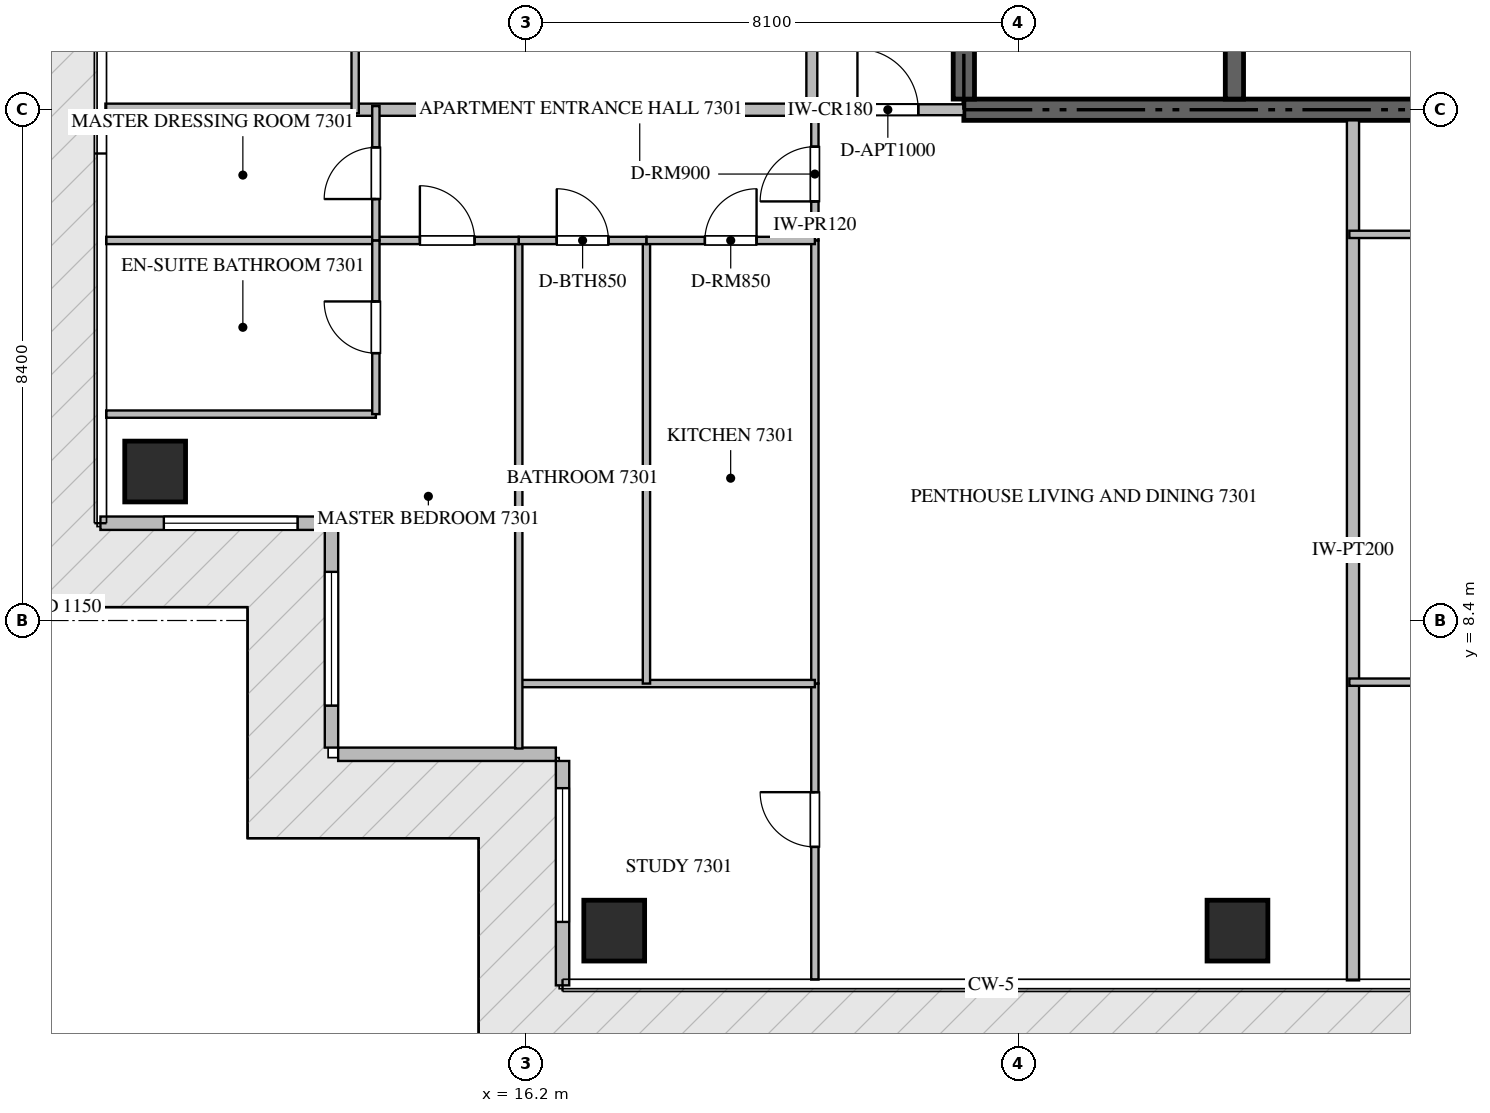
"""IFC4 building model, lengths in metres.
Left out: names, types, materials, properties, quantities, classifications, styles, units other than length and angle.
Written with IfcOpenShell. Run it as: python <this file> out.ifc"""

import sys

from ifc_helpers import new_model, si_unit, direction, frame, frame_2d, origin, origin_2d, place, context, subcontext, project, spatial, rectangle, extrude, source, transform, mapped, element, fill, save


model = new_model("IFC4")
c1 = context("Model", 3, precision=1e-05, world=origin(), true_north=direction((0.0, 1.0)))
c2 = subcontext(c1, "Body", "Model", "MODEL_VIEW")
j1 = project(units=[si_unit("LENGTHUNIT", "METRE"), si_unit("PLANEANGLEUNIT", "RADIAN")], contexts=[c1])
p1 = place(None, origin())
s1 = spatial("IfcSite", under=j1, at=p1, CompositionType="ELEMENT")
p2 = place(p1, origin())
s2 = spatial("IfcBuilding", under=s1, at=p2, CompositionType="ELEMENT")
p3 = place(p2, frame((0.0, 0.0, 293.45)))
s3 = spatial("IfcBuildingStorey", under=s2, at=p3, CompositionType="ELEMENT", Elevation=293.45)
p4 = place(p3, frame((23.4, 16.8, -0.26), z_axis=(0.0, 0.0, 1.0), x_axis=(1.0, 0.0, 0.0)))
e1 = element("IfcWall", 1, at=p4, inside=s3, PredefinedType="SHEAR", context=c2, shape_type="SweptSolid", body=[
    extrude(rectangle(XDim=18.0, YDim=0.35, at=frame_2d((9.0, 0.0))), origin(), (0.0, 0.0, 1.0), 4.048),
])
p5 = place(p3, frame((23.4, 16.975, -0.26), z_axis=(0.0, 0.0, 1.0), x_axis=(0.0, 1.0, 0.0)))
e2 = element("IfcWall", 2, at=p5, inside=s3, PredefinedType="SHEAR", context=c2, shape_type="SweptSolid", body=[
    extrude(rectangle(XDim=4.875, YDim=0.35, at=frame_2d((2.438, 0.0))), origin(), (0.0, 0.0, 1.0), 4.048),
])
p6 = place(p3, frame((27.85, 16.975, -0.26), z_axis=(0.0, 0.0, 1.0), x_axis=(0.0, 1.0, 0.0)))
e3 = element("IfcWall", 3, at=p6, inside=s3, PredefinedType="SHEAR", context=c2, shape_type="SweptSolid", body=[
    extrude(rectangle(XDim=4.875, YDim=0.3, at=frame_2d((2.438, 0.0))), origin(), (0.0, 0.0, 1.0), 4.048),
])
m1 = source(origin(), c2, "Body", "SweptSolid", [
    extrude(rectangle(XDim=1.0, YDim=1.0, at=origin_2d()), origin(), (0.0, 0.0, 1.0), 4.05),
])
for number, where, z_axis, x_axis in (
    (4, (17.65, 3.3, -0.26), (0.0, 0.0, 1.0), (1.0, 0.0, 0.0)),
    (5, (27.9, 3.3, -0.26), (0.0, 0.0, 1.0), (1.0, 0.0, 0.0)),
    (6, (10.1, 10.85, -0.26), (0.0, 0.0, 1.0), (1.0, 0.0, 0.0)),
):
    element("IfcColumn", number, at=place(p3, frame(where, z_axis=z_axis, x_axis=x_axis)), inside=s3, PredefinedType="COLUMN", context=c2, shape_type="MappedRepresentation", body=[
        mapped(m1, transform((0.0, 0.0, 0.0), scale=1.0)),
    ])
p7 = place(p3, frame((9.2, 10.0, 0.0), z_axis=(0.0, 0.0, 1.0), x_axis=(1.0, 0.0, 0.0)))
e7 = element("IfcWall", 7, at=p7, inside=s3, PredefinedType="ELEMENTEDWALL", context=c2, shape_type="SweptSolid", body=[
    extrude(rectangle(XDim=3.69, YDim=0.22, at=frame_2d((1.845, 0.0))), origin(), (0.0, 0.0, 1.0), 3.775),
])
p8 = place(p7, frame((1.043, 0.0, 0.65)))
e8 = element("IfcOpeningElement", 8, at=p8, cuts=e7, PredefinedType="OPENING", context=c2, shape_type="SweptSolid", body=[
    extrude(rectangle(XDim=2.2, YDim=2.4, at=frame_2d((1.1, 1.2))), frame((0.0, 0.12, 0.0), z_axis=(0.0, -1.0, 0.0), x_axis=(1.0, 0.0, 0.0)), (0.0, 0.0, 1.0), 0.24),
])
p9 = place(p3, frame((13.0, 9.89, 0.0), z_axis=(0.0, 0.0, 1.0), x_axis=(0.0, -1.0, 0.0)))
e9 = element("IfcWall", 9, at=p9, inside=s3, PredefinedType="ELEMENTEDWALL", context=c2, shape_type="SweptSolid", body=[
    extrude(rectangle(XDim=3.58, YDim=0.22, at=frame_2d((1.79, 0.0))), origin(), (0.0, 0.0, 1.0), 3.775),
])
p10 = place(p9, frame((0.69, 0.0, 0.65)))
e10 = element("IfcOpeningElement", 10, at=p10, cuts=e9, PredefinedType="OPENING", context=c2, shape_type="SweptSolid", body=[
    extrude(rectangle(XDim=2.2, YDim=2.4, at=frame_2d((1.1, 1.2))), frame((0.0, 0.12, 0.0), z_axis=(0.0, -1.0, 0.0), x_axis=(1.0, 0.0, 0.0)), (0.0, 0.0, 1.0), 0.24),
])
p11 = place(p3, frame((13.11, 6.2, 0.0), z_axis=(0.0, 0.0, 1.0), x_axis=(1.0, 0.0, 0.0)))
e11 = element("IfcWall", 11, at=p11, inside=s3, PredefinedType="ELEMENTEDWALL", context=c2, shape_type="SweptSolid", body=[
    extrude(rectangle(XDim=3.58, YDim=0.22, at=frame_2d((1.79, 0.0))), origin(), (0.0, 0.0, 1.0), 3.775),
])
p12 = place(p3, frame((16.8, 6.09, 0.0), z_axis=(0.0, 0.0, 1.0), x_axis=(0.0, -1.0, 0.0)))
e12 = element("IfcWall", 12, at=p12, inside=s3, PredefinedType="ELEMENTEDWALL", context=c2, shape_type="SweptSolid", body=[
    extrude(rectangle(XDim=3.69, YDim=0.22, at=frame_2d((1.845, 0.0))), origin(), (0.0, 0.0, 1.0), 3.775),
])
p13 = place(p12, frame((0.447, 0.0, 0.65)))
e13 = element("IfcOpeningElement", 13, at=p13, cuts=e12, PredefinedType="OPENING", context=c2, shape_type="SweptSolid", body=[
    extrude(rectangle(XDim=2.2, YDim=2.4, at=frame_2d((1.1, 1.2))), frame((0.0, 0.12, 0.0), z_axis=(0.0, -1.0, 0.0), x_axis=(1.0, 0.0, 0.0)), (0.0, 0.0, 1.0), 0.24),
])
p14 = place(p3, frame((29.8, 2.482, 0.0), z_axis=(0.0, 0.0, 1.0), x_axis=(0.0, 1.0, 0.0)))
e14 = element("IfcWall", 14, at=p14, inside=s3, PredefinedType="PARTITIONING", context=c2, shape_type="SweptSolid", body=[
    extrude(rectangle(XDim=14.143, YDim=0.2, at=frame_2d((7.072, 0.0))), origin(), (0.0, 0.0, 1.0), 3.79),
])
p15 = place(p3, frame((9.282, 16.8, 0.0), z_axis=(0.0, 0.0, 1.0), x_axis=(1.0, 0.0, 0.0)))
e15 = element("IfcWall", 15, at=p15, inside=s3, PredefinedType="PARTITIONING", context=c2, shape_type="SweptSolid", body=[
    extrude(rectangle(XDim=11.618, YDim=0.2, at=frame_2d((5.809, 0.0))), origin(), (0.0, 0.0, 1.0), 3.79),
])
p16 = place(p3, frame((20.902, 16.8, 0.0), z_axis=(0.0, 0.0, 1.0), x_axis=(1.0, 0.0, 0.0)))
e16 = element("IfcWall", 16, at=p16, inside=s3, PredefinedType="PARTITIONING", context=c2, shape_type="SweptSolid", body=[
    extrude(rectangle(XDim=2.496, YDim=0.18, at=frame_2d((1.248, 0.0))), origin(), (0.0, 0.0, 1.0), 3.79),
])
p17 = place(p16, frame((0.748, 0.0, 0.0)))
e17 = element("IfcOpeningElement", 17, at=p17, cuts=e16, PredefinedType="OPENING", context=c2, shape_type="SweptSolid", body=[
    extrude(rectangle(XDim=1.0, YDim=2.15, at=frame_2d((0.5, 1.075))), frame((0.0, 0.1, 0.0), z_axis=(0.0, -1.0, 0.0), x_axis=(1.0, 0.0, 0.0)), (0.0, 0.0, 1.0), 0.2),
])
p18 = place(p3, frame((20.9, 16.8, 0.0), z_axis=(0.0, 0.0, 1.0), x_axis=(0.0, 1.0, 0.0)))
e18 = element("IfcWall", 18, at=p18, inside=s3, PredefinedType="PARTITIONING", context=c2, shape_type="SweptSolid", body=[
    extrude(rectangle(XDim=16.8, YDim=0.18, at=frame_2d((8.4, 0.0))), origin(), (0.0, 0.0, 1.0), 3.79),
])
p19 = place(p18, frame((14.5, 0.0, 0.0)))
e19 = element("IfcOpeningElement", 19, at=p19, cuts=e18, PredefinedType="OPENING", context=c2, shape_type="SweptSolid", body=[
    extrude(rectangle(XDim=1.0, YDim=2.15, at=frame_2d((0.5, 1.075))), frame((0.0, 0.1, 0.0), z_axis=(0.0, -1.0, 0.0), x_axis=(1.0, 0.0, 0.0)), (0.0, 0.0, 1.0), 0.2),
])
p20 = place(p3, frame((20.95, 14.65, 0.0), z_axis=(0.0, 0.0, 1.0), x_axis=(0.0, 1.0, 0.0)))
e20 = element("IfcWall", 20, at=p20, inside=s3, PredefinedType="PARTITIONING", context=c2, shape_type="SweptSolid", body=[
    extrude(rectangle(XDim=2.148, YDim=0.12, at=frame_2d((1.074, 0.0))), origin(), (0.0, 0.0, 1.0), 3.79),
])
p21 = place(p20, frame((0.642, 0.0, 0.0)))
e21 = element("IfcOpeningElement", 21, at=p21, cuts=e20, PredefinedType="OPENING", context=c2, shape_type="SweptSolid", body=[
    extrude(rectangle(XDim=0.9, YDim=2.1, at=frame_2d((0.45, 1.05))), frame((0.0, 0.07, 0.0), z_axis=(0.0, -1.0, 0.0), x_axis=(1.0, 0.0, 0.0)), (0.0, 0.0, 1.0), 0.14),
])
p22 = place(p3, frame((20.95, 2.495, 0.0), z_axis=(0.0, 0.0, 1.0), x_axis=(0.0, 1.0, 0.0)))
e22 = element("IfcWall", 22, at=p22, inside=s3, PredefinedType="PARTITIONING", context=c2, shape_type="SweptSolid", body=[
    extrude(rectangle(XDim=4.868, YDim=0.12, at=frame_2d((2.434, 0.0))), origin(), (0.0, 0.0, 1.0), 3.79),
])
p23 = place(p22, frame((2.182, 0.0, 0.0)))
e23 = element("IfcOpeningElement", 23, at=p23, cuts=e22, PredefinedType="OPENING", context=c2, shape_type="SweptSolid", body=[
    extrude(rectangle(XDim=0.9, YDim=2.1, at=frame_2d((0.45, 1.05))), frame((0.0, 0.07, 0.0), z_axis=(0.0, -1.0, 0.0), x_axis=(1.0, 0.0, 0.0)), (0.0, 0.0, 1.0), 0.14),
])
p24 = place(p3, frame((20.95, 7.365, 0.0), z_axis=(0.0, 0.0, 1.0), x_axis=(0.0, 1.0, 0.0)))
e24 = element("IfcWall", 24, at=p24, inside=s3, PredefinedType="PARTITIONING", context=c2, shape_type="SweptSolid", body=[
    extrude(rectangle(XDim=7.283, YDim=0.12, at=frame_2d((3.642, 0.0))), origin(), (0.0, 0.0, 1.0), 3.79),
])
p25 = place(p3, frame((16.08, 7.363, 0.0), z_axis=(0.0, 0.0, 1.0), x_axis=(1.0, 0.0, 0.0)))
e25 = element("IfcWall", 25, at=p25, inside=s3, PredefinedType="PARTITIONING", context=c2, shape_type="SweptSolid", body=[
    extrude(rectangle(XDim=4.87, YDim=0.12, at=frame_2d((2.435, 0.0))), origin(), (0.0, 0.0, 1.0), 3.79),
])
p26 = place(p3, frame((16.08, 6.295, 0.0), z_axis=(0.0, 0.0, 1.0), x_axis=(0.0, 1.0, 0.0)))
e26 = element("IfcWall", 26, at=p26, inside=s3, PredefinedType="PARTITIONING", context=c2, shape_type="SweptSolid", body=[
    extrude(rectangle(XDim=8.355, YDim=0.12, at=frame_2d((4.177, 0.0))), origin(), (0.0, 0.0, 1.0), 3.79),
])
p27 = place(p3, frame((18.18, 7.363, 0.0), z_axis=(0.0, 0.0, 1.0), x_axis=(0.0, 1.0, 0.0)))
e27 = element("IfcWall", 27, at=p27, inside=s3, PredefinedType="PARTITIONING", context=c2, shape_type="SweptSolid", body=[
    extrude(rectangle(XDim=7.287, YDim=0.12, at=frame_2d((3.644, 0.0))), origin(), (0.0, 0.0, 1.0), 3.79),
])
p28 = place(p3, frame((16.08, 14.65, 0.0), z_axis=(0.0, 0.0, 1.0), x_axis=(1.0, 0.0, 0.0)))
e28 = element("IfcWall", 28, at=p28, inside=s3, PredefinedType="PARTITIONING", context=c2, shape_type="SweptSolid", body=[
    extrude(rectangle(XDim=2.1, YDim=0.12, at=frame_2d((1.05, 0.0))), origin(), (0.0, 0.0, 1.0), 3.79),
])
p29 = place(p28, frame((0.625, 0.0, 0.0)))
e29 = element("IfcOpeningElement", 29, at=p29, cuts=e28, PredefinedType="OPENING", context=c2, shape_type="SweptSolid", body=[
    extrude(rectangle(XDim=0.85, YDim=2.1, at=frame_2d((0.425, 1.05))), frame((0.0, 0.07, 0.0), z_axis=(0.0, -1.0, 0.0), x_axis=(1.0, 0.0, 0.0)), (0.0, 0.0, 1.0), 0.14),
])
p30 = place(p3, frame((18.182, 14.65, 0.0), z_axis=(0.0, 0.0, 1.0), x_axis=(1.0, 0.0, 0.0)))
e30 = element("IfcWall", 30, at=p30, inside=s3, PredefinedType="PARTITIONING", context=c2, shape_type="SweptSolid", body=[
    extrude(rectangle(XDim=2.768, YDim=0.12, at=frame_2d((1.384, 0.0))), origin(), (0.0, 0.0, 1.0), 3.79),
])
p31 = place(p30, frame((0.959, 0.0, 0.0)))
e31 = element("IfcOpeningElement", 31, at=p31, cuts=e30, PredefinedType="OPENING", context=c2, shape_type="SweptSolid", body=[
    extrude(rectangle(XDim=0.85, YDim=2.1, at=frame_2d((0.425, 1.05))), frame((0.0, 0.07, 0.0), z_axis=(0.0, -1.0, 0.0), x_axis=(1.0, 0.0, 0.0)), (0.0, 0.0, 1.0), 0.14),
])
p32 = place(p3, frame((13.73, 14.65, 0.0), z_axis=(0.0, 0.0, 1.0), x_axis=(1.0, 0.0, 0.0)))
e32 = element("IfcWall", 32, at=p32, inside=s3, PredefinedType="PARTITIONING", context=c2, shape_type="SweptSolid", body=[
    extrude(rectangle(XDim=2.348, YDim=0.12, at=frame_2d((1.174, 0.0))), origin(), (0.0, 0.0, 1.0), 3.79),
])
p33 = place(p32, frame((0.724, 0.0, 0.0)))
e33 = element("IfcOpeningElement", 33, at=p33, cuts=e32, PredefinedType="OPENING", context=c2, shape_type="SweptSolid", body=[
    extrude(rectangle(XDim=0.9, YDim=2.1, at=frame_2d((0.45, 1.05))), frame((0.0, 0.07, 0.0), z_axis=(0.0, -1.0, 0.0), x_axis=(1.0, 0.0, 0.0)), (0.0, 0.0, 1.0), 0.14),
])
p34 = place(p3, frame((9.295, 11.794, 0.0), z_axis=(0.0, 0.0, 1.0), x_axis=(1.0, 0.0, 0.0)))
e34 = element("IfcWall", 34, at=p34, inside=s3, PredefinedType="PARTITIONING", context=c2, shape_type="SweptSolid", body=[
    extrude(rectangle(XDim=4.435, YDim=0.12, at=frame_2d((2.218, 0.0))), origin(), (0.0, 0.0, 1.0), 3.79),
])
p35 = place(p3, frame((9.295, 14.65, 0.0), z_axis=(0.0, 0.0, 1.0), x_axis=(1.0, 0.0, 0.0)))
e35 = element("IfcWall", 35, at=p35, inside=s3, PredefinedType="PARTITIONING", context=c2, shape_type="SweptSolid", body=[
    extrude(rectangle(XDim=4.433, YDim=0.12, at=frame_2d((2.217, 0.0))), origin(), (0.0, 0.0, 1.0), 3.79),
])
p36 = place(p3, frame((13.73, 11.794, 0.0), z_axis=(0.0, 0.0, 1.0), x_axis=(0.0, 1.0, 0.0)))
e36 = element("IfcWall", 36, at=p36, inside=s3, PredefinedType="PARTITIONING", context=c2, shape_type="SweptSolid", body=[
    extrude(rectangle(XDim=2.856, YDim=0.12, at=frame_2d((1.428, 0.0))), origin(), (0.0, 0.0, 1.0), 3.79),
])
p37 = place(p36, frame((1.003, 0.0, 0.0)))
e37 = element("IfcOpeningElement", 37, at=p37, cuts=e36, PredefinedType="OPENING", context=c2, shape_type="SweptSolid", body=[
    extrude(rectangle(XDim=0.85, YDim=2.1, at=frame_2d((0.425, 1.05))), frame((0.0, 0.07, 0.0), z_axis=(0.0, -1.0, 0.0), x_axis=(1.0, 0.0, 0.0)), (0.0, 0.0, 1.0), 0.14),
])
p38 = place(p3, frame((13.73, 14.652, 0.0), z_axis=(0.0, 0.0, 1.0), x_axis=(0.0, 1.0, 0.0)))
e38 = element("IfcWall", 38, at=p38, inside=s3, PredefinedType="PARTITIONING", context=c2, shape_type="SweptSolid", body=[
    extrude(rectangle(XDim=2.208, YDim=0.12, at=frame_2d((1.104, 0.0))), origin(), (0.0, 0.0, 1.0), 3.79),
])
p39 = place(p38, frame((0.679, 0.0, 0.0)))
e39 = element("IfcOpeningElement", 39, at=p39, cuts=e38, PredefinedType="OPENING", context=c2, shape_type="SweptSolid", body=[
    extrude(rectangle(XDim=0.85, YDim=2.1, at=frame_2d((0.425, 1.05))), frame((0.0, 0.07, 0.0), z_axis=(0.0, -1.0, 0.0), x_axis=(1.0, 0.0, 0.0)), (0.0, 0.0, 1.0), 0.14),
])
for number, where, z_axis, x_axis in (
    (40, (29.74, 7.386, 0.0), (0.0, 0.0, 1.0), (1.0, 0.0, 0.0)),
    (41, (29.74, 14.75, 0.0), (0.0, 0.0, 1.0), (1.0, 0.0, 0.0)),
):
    element("IfcWall", number, at=place(p3, frame(where, z_axis=z_axis, x_axis=x_axis)), inside=s3, PredefinedType="PARTITIONING", context=c2, shape_type="SweptSolid", body=[
        extrude(rectangle(XDim=8.76, YDim=0.12, at=frame_2d((4.38, 0.0))), origin(), (0.0, 0.0, 1.0), 3.79),
    ])
p40 = place(p3, frame((13.389, 16.74, 0.0), z_axis=(0.0, 0.0, 1.0), x_axis=(0.0, 1.0, 0.0)))
e42 = element("IfcWall", 42, at=p40, inside=s3, PredefinedType="PARTITIONING", context=c2, shape_type="SweptSolid", body=[
    extrude(rectangle(XDim=10.48, YDim=0.12, at=frame_2d((5.24, 0.0))), origin(), (0.0, 0.0, 1.0), 3.79),
])
m2 = source(origin(), c2, "Body", "SweptSolid", [
    extrude(rectangle(XDim=2.2, YDim=2.4, at=frame_2d((1.1, 1.2))), frame((0.0, 0.03, 0.0), z_axis=(0.0, -1.0, 0.0), x_axis=(1.0, 0.0, 0.0)), (0.0, 0.0, 1.0), 0.06),
])
p41 = place(p8, origin())
e43 = element("IfcWindow", 43, at=p41, inside=s3, PartitioningType="SINGLE_PANEL", PredefinedType="WINDOW", context=c2, shape_type="MappedRepresentation", body=[
    mapped(m2, transform((0.0, 0.0, 0.0), scale=1.0)),
])
fill(e8, e43)
p42 = place(p10, origin())
e44 = element("IfcWindow", 44, at=p42, inside=s3, PartitioningType="SINGLE_PANEL", PredefinedType="WINDOW", context=c2, shape_type="MappedRepresentation", body=[
    mapped(m2, transform((0.0, 0.0, 0.0), scale=1.0)),
])
fill(e10, e44)
p43 = place(p13, origin())
e45 = element("IfcWindow", 45, at=p43, inside=s3, PartitioningType="SINGLE_PANEL", PredefinedType="WINDOW", context=c2, shape_type="MappedRepresentation", body=[
    mapped(m2, transform((0.0, 0.0, 0.0), scale=1.0)),
])
fill(e13, e45)
m3 = source(origin(), c2, "Body", "SweptSolid", [
    extrude(rectangle(XDim=1.0, YDim=2.15, at=frame_2d((0.5, 1.075))), frame((0.0, 0.025, 0.0), z_axis=(0.0, -1.0, 0.0), x_axis=(1.0, 0.0, 0.0)), (0.0, 0.0, 1.0), 0.05),
])
p44 = place(p17, origin())
e46 = element("IfcDoor", 46, at=p44, inside=s3, OperationType="SINGLE_SWING_LEFT", PredefinedType="DOOR", context=c2, shape_type="MappedRepresentation", body=[
    mapped(m3, transform((0.0, 0.0, 0.0), scale=1.0)),
])
fill(e17, e46)
m4 = source(origin(), c2, "Body", "SweptSolid", [
    extrude(rectangle(XDim=0.9, YDim=2.1, at=frame_2d((0.45, 1.05))), frame((0.0, 0.025, 0.0), z_axis=(0.0, -1.0, 0.0), x_axis=(1.0, 0.0, 0.0)), (0.0, 0.0, 1.0), 0.05),
])
p45 = place(p21, origin())
e47 = element("IfcDoor", 47, at=p45, inside=s3, OperationType="SINGLE_SWING_LEFT", PredefinedType="DOOR", context=c2, shape_type="MappedRepresentation", body=[
    mapped(m4, transform((0.0, 0.0, 0.0), scale=1.0)),
])
fill(e21, e47)
p46 = place(p23, origin())
e48 = element("IfcDoor", 48, at=p46, inside=s3, OperationType="SINGLE_SWING_RIGHT", PredefinedType="DOOR", context=c2, shape_type="MappedRepresentation", body=[
    mapped(m4, transform((0.0, 0.0, 0.0), scale=1.0)),
])
fill(e23, e48)
m5 = source(origin(), c2, "Body", "SweptSolid", [
    extrude(rectangle(XDim=0.85, YDim=2.1, at=frame_2d((0.425, 1.05))), frame((0.0, 0.025, 0.0), z_axis=(0.0, -1.0, 0.0), x_axis=(1.0, 0.0, 0.0)), (0.0, 0.0, 1.0), 0.05),
])
p47 = place(p29, origin())
e49 = element("IfcDoor", 49, at=p47, inside=s3, OperationType="SINGLE_SWING_LEFT", PredefinedType="DOOR", context=c2, shape_type="MappedRepresentation", body=[
    mapped(m5, transform((0.0, 0.0, 0.0), scale=1.0)),
])
fill(e29, e49)
p48 = place(p31, origin())
e50 = element("IfcDoor", 50, at=p48, inside=s3, OperationType="SINGLE_SWING_RIGHT", PredefinedType="DOOR", context=c2, shape_type="MappedRepresentation", body=[
    mapped(m5, transform((0.0, 0.0, 0.0), scale=1.0)),
])
fill(e31, e50)
p49 = place(p33, origin())
e51 = element("IfcDoor", 51, at=p49, inside=s3, OperationType="SINGLE_SWING_LEFT", PredefinedType="DOOR", context=c2, shape_type="MappedRepresentation", body=[
    mapped(m4, transform((0.0, 0.0, 0.0), scale=1.0)),
])
fill(e33, e51)
p50 = place(p37, origin())
e52 = element("IfcDoor", 52, at=p50, inside=s3, OperationType="SINGLE_SWING_RIGHT", PredefinedType="DOOR", context=c2, shape_type="MappedRepresentation", body=[
    mapped(m5, transform((0.0, 0.0, 0.0), scale=1.0)),
])
fill(e37, e52)
p51 = place(p39, origin())
e53 = element("IfcDoor", 53, at=p51, inside=s3, OperationType="SINGLE_SWING_LEFT", PredefinedType="DOOR", context=c2, shape_type="MappedRepresentation", body=[
    mapped(m5, transform((0.0, 0.0, 0.0), scale=1.0)),
])
fill(e39, e53)
save(model, sys.argv[1])
